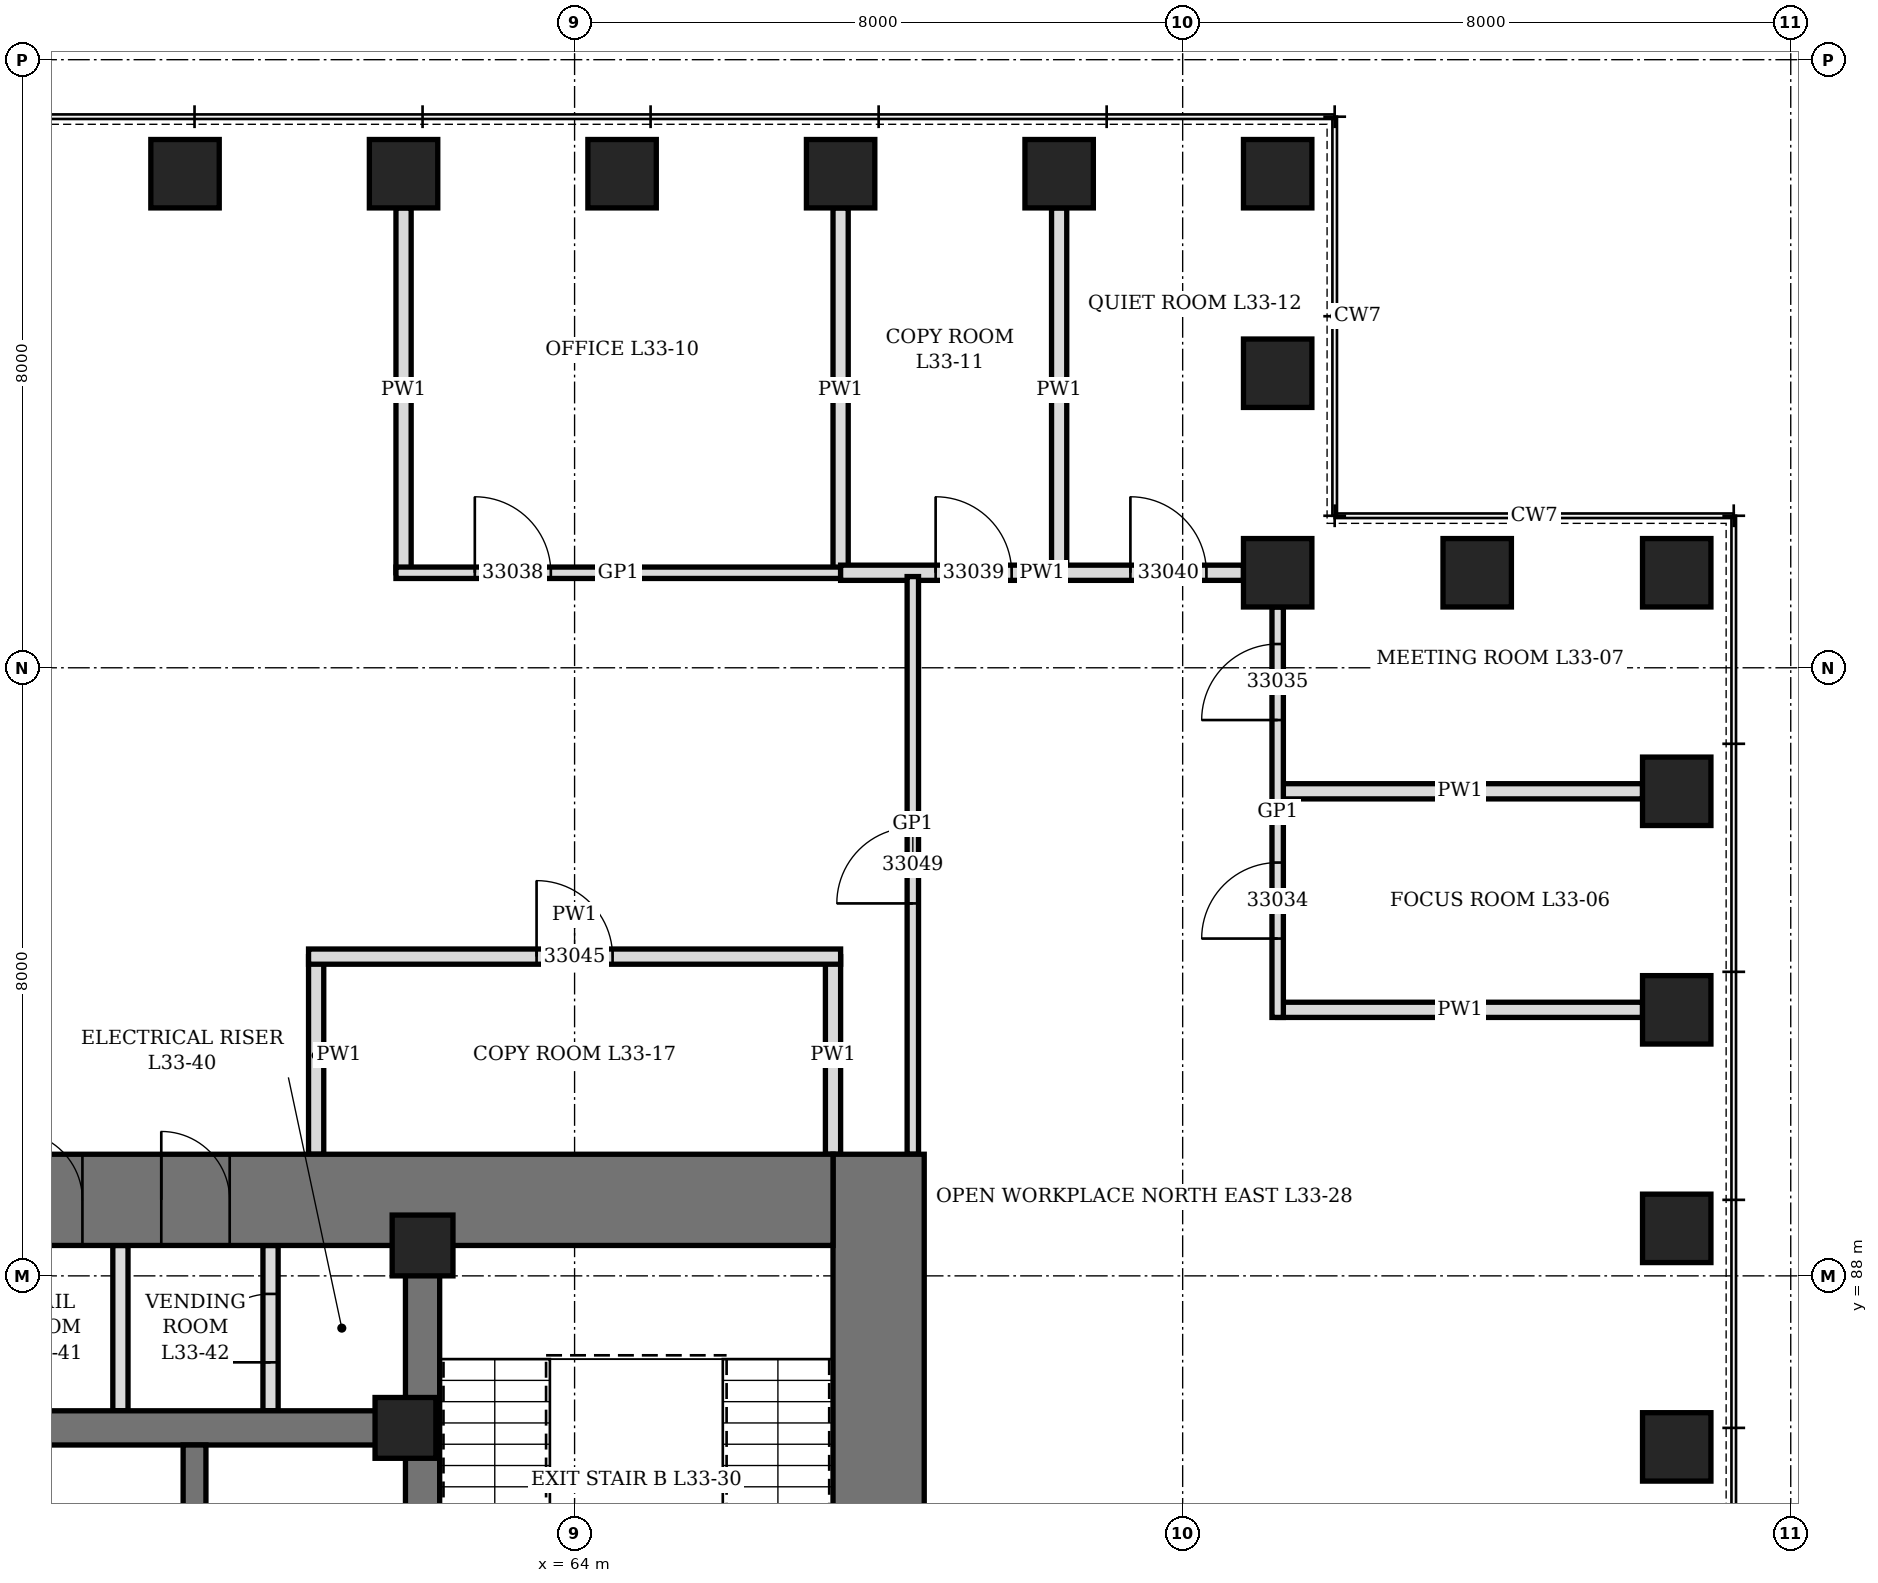
"""IFC4 building model, lengths in metres.
Left out: names, types, materials, properties, quantities, classifications, styles, units other than length and angle.
Written with IfcOpenShell. Run it as: python <this file> out.ifc"""

import sys

from ifc_helpers import new_model, si_unit, direction, frame, frame_2d, origin, origin_2d, place, context, subcontext, project, spatial, rectangle, hollow_rectangle, extrude, element, fill, save


model = new_model("IFC4")
c1 = context("Model", 3, precision=1e-05, world=origin(), true_north=direction((0.0, 1.0)))
c2 = subcontext(c1, "Body", "Model", "MODEL_VIEW")
j1 = project(units=[si_unit("LENGTHUNIT", "METRE"), si_unit("PLANEANGLEUNIT", "RADIAN")], contexts=[c1])
p1 = place(None, origin())
s1 = spatial("IfcSite", under=j1, at=p1, CompositionType="ELEMENT")
p2 = place(p1, origin())
s2 = spatial("IfcBuilding", under=s1, at=p2, CompositionType="ELEMENT")
p3 = place(p2, frame((0.0, 0.0, 150.1)))
s3 = spatial("IfcBuildingStorey", under=s2, at=p3, CompositionType="ELEMENT", Elevation=150.1)
for number, where, z_axis, x_axis in (
    (1, (78.5, 85.75, 0.0), (0.0, 0.0, 1.0), (0.0, 1.0, 0.0)),
    (2, (78.5, 88.625, 0.0), (0.0, 0.0, 1.0), (0.0, 1.0, 0.0)),
    (3, (78.5, 91.5, 0.0), (0.0, 0.0, 1.0), (0.0, 1.0, 0.0)),
    (4, (78.5, 94.375, 0.0), (0.0, 0.0, 1.0), (0.0, 1.0, 0.0)),
    (5, (78.5, 97.25, 0.0), (0.0, 0.0, 1.0), (1.0, 0.0, 0.0)),
    (6, (75.875, 97.25, 0.0), (0.0, 0.0, 1.0), (1.0, 0.0, 0.0)),
    (7, (73.25, 97.25, 0.0), (0.0, 0.0, 1.0), (0.0, 1.0, 0.0)),
    (8, (73.25, 99.875, 0.0), (0.0, 0.0, 1.0), (0.0, 1.0, 0.0)),
    (9, (73.25, 102.5, 0.0), (0.0, 0.0, 1.0), (1.0, 0.0, 0.0)),
    (10, (70.375, 102.5, 0.0), (0.0, 0.0, 1.0), (1.0, 0.0, 0.0)),
    (11, (67.5, 102.5, 0.0), (0.0, 0.0, 1.0), (1.0, 0.0, 0.0)),
    (12, (64.625, 102.5, 0.0), (0.0, 0.0, 1.0), (1.0, 0.0, 0.0)),
    (13, (61.75, 102.5, 0.0), (0.0, 0.0, 1.0), (1.0, 0.0, 0.0)),
    (14, (58.875, 102.5, 0.0), (0.0, 0.0, 1.0), (1.0, 0.0, 0.0)),
):
    element("IfcColumn", number, at=place(p3, frame(where, z_axis=z_axis, x_axis=x_axis)), inside=s3, PredefinedType="COLUMN", context=c2, shape_type="SweptSolid", body=[
        extrude(hollow_rectangle(XDim=0.9, YDim=0.9, WallThickness=0.12, at=origin_2d()), origin(), (0.0, 0.0, 1.0), 4.2),
    ])
p4 = place(p3, frame((68.0, 70.4, 0.0), z_axis=(0.0, 0.0, 1.0), x_axis=(0.0, 1.0, 0.0)))
e15 = element("IfcWall", 15, at=p4, inside=s3, PredefinedType="SHEAR", context=c2, shape_type="SweptSolid", body=[
    extrude(rectangle(XDim=19.2, YDim=1.2, at=frame_2d((9.6, 0.0))), origin(), (0.0, 0.0, 1.0), 4.2),
])
p5 = place(p4, frame((8.6, 0.0, 0.0)))
e16 = element("IfcOpeningElement", 16, at=p5, cuts=e15, PredefinedType="OPENING", context=c2, shape_type="SweptSolid", body=[
    extrude(rectangle(XDim=2.0, YDim=2.4, at=frame_2d((1.0, 1.2))), frame((0.0, 0.61, 0.0), z_axis=(0.0, -1.0, 0.0), x_axis=(1.0, 0.0, 0.0)), (0.0, 0.0, 1.0), 1.22),
])
p6 = place(p3, frame((44.6, 89.0, 0.0), z_axis=(0.0, 0.0, 1.0), x_axis=(1.0, 0.0, 0.0)))
e17 = element("IfcWall", 17, at=p6, inside=s3, PredefinedType="SHEAR", context=c2, shape_type="SweptSolid", body=[
    extrude(rectangle(XDim=22.8, YDim=1.2, at=frame_2d((11.4, 0.0))), origin(), (0.0, 0.0, 1.0), 4.2),
])
p7 = place(p6, frame((9.275, 0.0, 0.0)))
e18 = element("IfcOpeningElement", 18, at=p7, cuts=e17, PredefinedType="OPENING", context=c2, shape_type="SweptSolid", body=[
    extrude(rectangle(XDim=1.0, YDim=2.1, at=frame_2d((0.5, 1.05))), frame((0.0, 0.61, 0.0), z_axis=(0.0, -1.0, 0.0), x_axis=(1.0, 0.0, 0.0)), (0.0, 0.0, 1.0), 1.22),
])
p8 = place(p6, frame((6.45, 0.0, 0.0)))
e19 = element("IfcOpeningElement", 19, at=p8, cuts=e17, PredefinedType="OPENING", context=c2, shape_type="SweptSolid", body=[
    extrude(rectangle(XDim=0.9, YDim=2.1, at=frame_2d((0.45, 1.05))), frame((0.0, 0.61, 0.0), z_axis=(0.0, -1.0, 0.0), x_axis=(1.0, 0.0, 0.0)), (0.0, 0.0, 1.0), 1.22),
])
p9 = place(p6, frame((12.025, 0.0, 0.0)))
e20 = element("IfcOpeningElement", 20, at=p9, cuts=e17, PredefinedType="OPENING", context=c2, shape_type="SweptSolid", body=[
    extrude(rectangle(XDim=0.9, YDim=2.1, at=frame_2d((0.45, 1.05))), frame((0.0, 0.61, 0.0), z_axis=(0.0, -1.0, 0.0), x_axis=(1.0, 0.0, 0.0)), (0.0, 0.0, 1.0), 1.22),
])
p10 = place(p6, frame((13.962, 0.0, 0.0)))
e21 = element("IfcOpeningElement", 21, at=p10, cuts=e17, PredefinedType="OPENING", context=c2, shape_type="SweptSolid", body=[
    extrude(rectangle(XDim=0.9, YDim=2.1, at=frame_2d((0.45, 1.05))), frame((0.0, 0.61, 0.0), z_axis=(0.0, -1.0, 0.0), x_axis=(1.0, 0.0, 0.0)), (0.0, 0.0, 1.0), 1.22),
])
p11 = place(p3, frame((62.0, 71.6, 0.0), z_axis=(0.0, 0.0, 1.0), x_axis=(0.0, 1.0, 0.0)))
e22 = element("IfcWall", 22, at=p11, inside=s3, PredefinedType="SHEAR", context=c2, shape_type="SweptSolid", body=[
    extrude(rectangle(XDim=16.8, YDim=0.45, at=frame_2d((8.4, 0.0))), origin(), (0.0, 0.0, 1.0), 4.2),
])
p12 = place(p11, frame((7.5, 0.0, 0.0)))
e23 = element("IfcOpeningElement", 23, at=p12, cuts=e22, PredefinedType="OPENING", context=c2, shape_type="SweptSolid", body=[
    extrude(rectangle(XDim=1.8, YDim=2.4, at=frame_2d((0.9, 1.2))), frame((0.0, 0.235, 0.0), z_axis=(0.0, -1.0, 0.0), x_axis=(1.0, 0.0, 0.0)), (0.0, 0.0, 1.0), 0.47),
])
p13 = place(p3, frame((50.225, 86.0, 0.0), z_axis=(0.0, 0.0, 1.0), x_axis=(1.0, 0.0, 0.0)))
e24 = element("IfcWall", 24, at=p13, inside=s3, PredefinedType="SHEAR", context=c2, shape_type="SweptSolid", body=[
    extrude(rectangle(XDim=11.55, YDim=0.45, at=frame_2d((5.775, 0.0))), origin(), (0.0, 0.0, 1.0), 4.2),
])
p14 = place(p3, frame((59.0, 82.225, 0.0), z_axis=(0.0, 0.0, 1.0), x_axis=(0.0, 1.0, 0.0)))
e25 = element("IfcWall", 25, at=p14, inside=s3, PredefinedType="SHEAR", context=c2, shape_type="SweptSolid", body=[
    extrude(rectangle(XDim=3.55, YDim=0.3, at=frame_2d((1.775, 0.0))), origin(), (0.0, 0.0, 1.0), 4.2),
])
for number, where, z_axis, x_axis in (
    (26, (61.775, 86.0, 0.0), (0.0, 0.0, 1.0), (1.0, 0.0, 0.0)),
    (27, (62.0, 88.4, 0.0), (0.0, 0.0, 1.0), (1.0, 0.0, 0.0)),
):
    element("IfcColumn", number, at=place(p3, frame(where, z_axis=z_axis, x_axis=x_axis)), inside=s3, PredefinedType="COLUMN", context=c2, shape_type="SweptSolid", body=[
        extrude(hollow_rectangle(XDim=0.8, YDim=0.8, WallThickness=0.1, at=origin_2d()), origin(), (0.0, 0.0, 1.0), 4.2),
    ])
p15 = place(p3, frame((60.0, 86.225, 0.0), z_axis=(0.0, 0.0, 1.0), x_axis=(0.0, 1.0, 0.0)))
e28 = element("IfcWall", 28, at=p15, inside=s3, PredefinedType="PARTITIONING", context=c2, shape_type="SweptSolid", body=[
    extrude(rectangle(XDim=2.175, YDim=0.2, at=frame_2d((1.087, 0.0))), origin(), (0.0, 0.0, 1.0), 4.04),
])
p16 = place(p15, frame((0.637, 0.0, 0.0)))
e29 = element("IfcOpeningElement", 29, at=p16, cuts=e28, PredefinedType="OPENING", context=c2, shape_type="SweptSolid", body=[
    extrude(rectangle(XDim=0.9, YDim=2.1, at=frame_2d((0.45, 1.05))), frame((0.0, 0.11, 0.0), z_axis=(0.0, -1.0, 0.0), x_axis=(1.0, 0.0, 0.0)), (0.0, 0.0, 1.0), 0.22),
])
p17 = place(p3, frame((58.025, 86.225, 0.0), z_axis=(0.0, 0.0, 1.0), x_axis=(0.0, 1.0, 0.0)))
e30 = element("IfcWall", 30, at=p17, inside=s3, PredefinedType="PARTITIONING", context=c2, shape_type="SweptSolid", body=[
    extrude(rectangle(XDim=2.175, YDim=0.2, at=frame_2d((1.087, 0.0))), origin(), (0.0, 0.0, 1.0), 4.04),
])
for number, where, z_axis, x_axis in (
    (31, (73.25, 91.5, 0.0), (0.0, 0.0, 1.0), (1.0, 0.0, 0.0)),
    (32, (73.25, 94.375, 0.0), (0.0, 0.0, 1.0), (1.0, 0.0, 0.0)),
):
    element("IfcWall", number, at=place(p3, frame(where, z_axis=z_axis, x_axis=x_axis)), inside=s3, PredefinedType="PARTITIONING", context=c2, shape_type="SweptSolid", body=[
        extrude(rectangle(XDim=4.8, YDim=0.2, at=frame_2d((2.4, 0.0))), origin(), (0.0, 0.0, 1.0), 3.428),
    ])
p18 = place(p3, frame((61.75, 97.25, 0.0), z_axis=(0.0, 0.0, 1.0), x_axis=(0.0, 1.0, 0.0)))
e33 = element("IfcWall", 33, at=p18, inside=s3, PredefinedType="PARTITIONING", context=c2, shape_type="SweptSolid", body=[
    extrude(rectangle(XDim=4.8, YDim=0.2, at=frame_2d((2.4, 0.0))), origin(), (0.0, 0.0, 1.0), 3.278),
])
p19 = place(p3, frame((67.5, 97.25, 0.0), z_axis=(0.0, 0.0, 1.0), x_axis=(0.0, 1.0, 0.0)))
e34 = element("IfcWall", 34, at=p19, inside=s3, PredefinedType="PARTITIONING", context=c2, shape_type="SweptSolid", body=[
    extrude(rectangle(XDim=4.8, YDim=0.2, at=frame_2d((2.4, 0.0))), origin(), (0.0, 0.0, 1.0), 2.74),
])
p20 = place(p3, frame((70.375, 97.25, 0.0), z_axis=(0.0, 0.0, 1.0), x_axis=(0.0, 1.0, 0.0)))
e35 = element("IfcWall", 35, at=p20, inside=s3, PredefinedType="PARTITIONING", context=c2, shape_type="SweptSolid", body=[
    extrude(rectangle(XDim=4.8, YDim=0.2, at=frame_2d((2.4, 0.0))), origin(), (0.0, 0.0, 1.0), 3.428),
])
p21 = place(p3, frame((60.6, 89.6, 0.0), z_axis=(0.0, 0.0, 1.0), x_axis=(0.0, 1.0, 0.0)))
e36 = element("IfcWall", 36, at=p21, inside=s3, PredefinedType="PARTITIONING", context=c2, shape_type="SweptSolid", body=[
    extrude(rectangle(XDim=2.6, YDim=0.2, at=frame_2d((1.3, 0.0))), origin(), (0.0, 0.0, 1.0), 4.04),
])
p22 = place(p3, frame((67.4, 89.6, 0.0), z_axis=(0.0, 0.0, 1.0), x_axis=(0.0, 1.0, 0.0)))
e37 = element("IfcWall", 37, at=p22, inside=s3, PredefinedType="PARTITIONING", context=c2, shape_type="SweptSolid", body=[
    extrude(rectangle(XDim=2.6, YDim=0.2, at=frame_2d((1.3, 0.0))), origin(), (0.0, 0.0, 1.0), 2.74),
])
p23 = place(p3, frame((60.5, 92.2, 0.0), z_axis=(0.0, 0.0, 1.0), x_axis=(1.0, 0.0, 0.0)))
e38 = element("IfcWall", 38, at=p23, inside=s3, PredefinedType="PARTITIONING", context=c2, shape_type="SweptSolid", body=[
    extrude(rectangle(XDim=7.0, YDim=0.2, at=frame_2d((3.5, 0.0))), origin(), (0.0, 0.0, 1.0), 4.04),
])
p24 = place(p23, frame((3.0, 0.0, 0.0)))
e39 = element("IfcOpeningElement", 39, at=p24, cuts=e38, PredefinedType="OPENING", context=c2, shape_type="SweptSolid", body=[
    extrude(rectangle(XDim=1.0, YDim=2.1, at=frame_2d((0.5, 1.05))), frame((0.0, 0.11, 0.0), z_axis=(0.0, -1.0, 0.0), x_axis=(1.0, 0.0, 0.0)), (0.0, 0.0, 1.0), 0.22),
])
p25 = place(p3, frame((61.65, 97.25, 0.0), z_axis=(0.0, 0.0, 1.0), x_axis=(1.0, 0.0, 0.0)))
e40 = element("IfcWall", 40, at=p25, inside=s3, PredefinedType="PARTITIONING", context=c2, shape_type="SweptSolid", body=[
    extrude(rectangle(XDim=5.85, YDim=0.15, at=frame_2d((2.925, 0.0))), origin(), (0.0, 0.0, 1.0), 4.04),
])
p26 = place(p25, frame((1.038, 0.0, 0.0)))
e41 = element("IfcOpeningElement", 41, at=p26, cuts=e40, PredefinedType="OPENING", context=c2, shape_type="SweptSolid", body=[
    extrude(rectangle(XDim=1.0, YDim=2.1, at=frame_2d((0.5, 1.05))), frame((0.0, 0.085, 0.0), z_axis=(0.0, -1.0, 0.0), x_axis=(1.0, 0.0, 0.0)), (0.0, 0.0, 1.0), 0.17),
])
p27 = place(p3, frame((67.5, 97.25, 0.0), z_axis=(0.0, 0.0, 1.0), x_axis=(1.0, 0.0, 0.0)))
e42 = element("IfcWall", 42, at=p27, inside=s3, PredefinedType="PARTITIONING", context=c2, shape_type="SweptSolid", body=[
    extrude(rectangle(XDim=5.3, YDim=0.2, at=frame_2d((2.65, 0.0))), origin(), (0.0, 0.0, 1.0), 4.04),
])
p28 = place(p27, frame((1.25, 0.0, 0.0)))
e43 = element("IfcOpeningElement", 43, at=p28, cuts=e42, PredefinedType="OPENING", context=c2, shape_type="SweptSolid", body=[
    extrude(rectangle(XDim=1.0, YDim=2.1, at=frame_2d((0.5, 1.05))), frame((0.0, 0.11, 0.0), z_axis=(0.0, -1.0, 0.0), x_axis=(1.0, 0.0, 0.0)), (0.0, 0.0, 1.0), 0.22),
])
p29 = place(p27, frame((3.812, 0.0, 0.0)))
e44 = element("IfcOpeningElement", 44, at=p29, cuts=e42, PredefinedType="OPENING", context=c2, shape_type="SweptSolid", body=[
    extrude(rectangle(XDim=1.0, YDim=2.1, at=frame_2d((0.5, 1.05))), frame((0.0, 0.11, 0.0), z_axis=(0.0, -1.0, 0.0), x_axis=(1.0, 0.0, 0.0)), (0.0, 0.0, 1.0), 0.22),
])
p30 = place(p3, frame((68.45, 89.6, 0.0), z_axis=(0.0, 0.0, 1.0), x_axis=(0.0, 1.0, 0.0)))
e45 = element("IfcWall", 45, at=p30, inside=s3, PredefinedType="PARTITIONING", context=c2, shape_type="SweptSolid", body=[
    extrude(rectangle(XDim=7.6, YDim=0.15, at=frame_2d((3.8, 0.0))), origin(), (0.0, 0.0, 1.0), 4.04),
])
p31 = place(p30, frame((3.3, 0.0, 0.0)))
e46 = element("IfcOpeningElement", 46, at=p31, cuts=e45, PredefinedType="OPENING", context=c2, shape_type="SweptSolid", body=[
    extrude(rectangle(XDim=1.0, YDim=2.4, at=frame_2d((0.5, 1.2))), frame((0.0, 0.085, 0.0), z_axis=(0.0, -1.0, 0.0), x_axis=(1.0, 0.0, 0.0)), (0.0, 0.0, 1.0), 0.17),
])
p32 = place(p3, frame((73.25, 91.4, 0.0), z_axis=(0.0, 0.0, 1.0), x_axis=(0.0, 1.0, 0.0)))
e47 = element("IfcWall", 47, at=p32, inside=s3, PredefinedType="PARTITIONING", context=c2, shape_type="SweptSolid", body=[
    extrude(rectangle(XDim=5.4, YDim=0.15, at=frame_2d((2.7, 0.0))), origin(), (0.0, 0.0, 1.0), 4.04),
])
p33 = place(p32, frame((1.038, 0.0, 0.0)))
e48 = element("IfcOpeningElement", 48, at=p33, cuts=e47, PredefinedType="OPENING", context=c2, shape_type="SweptSolid", body=[
    extrude(rectangle(XDim=1.0, YDim=2.4, at=frame_2d((0.5, 1.2))), frame((0.0, 0.085, 0.0), z_axis=(0.0, -1.0, 0.0), x_axis=(1.0, 0.0, 0.0)), (0.0, 0.0, 1.0), 0.17),
])
p34 = place(p32, frame((3.913, 0.0, 0.0)))
e49 = element("IfcOpeningElement", 49, at=p34, cuts=e47, PredefinedType="OPENING", context=c2, shape_type="SweptSolid", body=[
    extrude(rectangle(XDim=1.0, YDim=2.4, at=frame_2d((0.5, 1.2))), frame((0.0, 0.085, 0.0), z_axis=(0.0, -1.0, 0.0), x_axis=(1.0, 0.0, 0.0)), (0.0, 0.0, 1.0), 0.17),
])
p35 = place(p9, origin())
e50 = element("IfcDoor", 50, at=p35, inside=s3, OperationType="SINGLE_SWING_LEFT", PredefinedType="DOOR", context=c2, shape_type="SweptSolid", body=[
    extrude(rectangle(XDim=0.9, YDim=2.1, at=frame_2d((0.45, 1.05))), frame((0.0, 0.35, 0.0), z_axis=(0.0, -1.0, 0.0), x_axis=(1.0, 0.0, 0.0)), (0.0, 0.0, 1.0), 0.7),
])
fill(e20, e50)
p36 = place(p10, origin())
e51 = element("IfcDoor", 51, at=p36, inside=s3, OperationType="SINGLE_SWING_LEFT", PredefinedType="DOOR", context=c2, shape_type="SweptSolid", body=[
    extrude(rectangle(XDim=0.9, YDim=2.1, at=frame_2d((0.45, 1.05))), frame((0.0, 0.35, 0.0), z_axis=(0.0, -1.0, 0.0), x_axis=(1.0, 0.0, 0.0)), (0.0, 0.0, 1.0), 0.7),
])
fill(e21, e51)
p37 = place(p16, origin())
e52 = element("IfcDoor", 52, at=p37, inside=s3, OperationType="SINGLE_SWING_LEFT", PredefinedType="DOOR", context=c2, shape_type="SweptSolid", body=[
    extrude(rectangle(XDim=0.9, YDim=2.1, at=frame_2d((0.45, 1.05))), frame((0.0, 0.1, 0.0), z_axis=(0.0, -1.0, 0.0), x_axis=(1.0, 0.0, 0.0)), (0.0, 0.0, 1.0), 0.199),
])
fill(e29, e52)
p38 = place(p33, origin())
e53 = element("IfcDoor", 53, at=p38, inside=s3, OperationType="SINGLE_SWING_RIGHT", PredefinedType="DOOR", context=c2, shape_type="SweptSolid", body=[
    extrude(rectangle(XDim=1.0, YDim=2.4, at=frame_2d((0.5, 1.2))), frame((0.0, 0.075, 0.0), z_axis=(0.0, -1.0, 0.0), x_axis=(1.0, 0.0, 0.0)), (0.0, 0.0, 1.0), 0.149),
])
fill(e48, e53)
p39 = place(p34, origin())
e54 = element("IfcDoor", 54, at=p39, inside=s3, OperationType="SINGLE_SWING_RIGHT", PredefinedType="DOOR", context=c2, shape_type="SweptSolid", body=[
    extrude(rectangle(XDim=1.0, YDim=2.4, at=frame_2d((0.5, 1.2))), frame((0.0, 0.075, 0.0), z_axis=(0.0, -1.0, 0.0), x_axis=(1.0, 0.0, 0.0)), (0.0, 0.0, 1.0), 0.149),
])
fill(e49, e54)
p40 = place(p26, origin())
e55 = element("IfcDoor", 55, at=p40, inside=s3, OperationType="SINGLE_SWING_LEFT", PredefinedType="DOOR", context=c2, shape_type="SweptSolid", body=[
    extrude(rectangle(XDim=1.0, YDim=2.1, at=frame_2d((0.5, 1.05))), frame((0.0, 0.075, 0.0), z_axis=(0.0, -1.0, 0.0), x_axis=(1.0, 0.0, 0.0)), (0.0, 0.0, 1.0), 0.149),
])
fill(e41, e55)
p41 = place(p28, origin())
e56 = element("IfcDoor", 56, at=p41, inside=s3, OperationType="SINGLE_SWING_LEFT", PredefinedType="DOOR", context=c2, shape_type="SweptSolid", body=[
    extrude(rectangle(XDim=1.0, YDim=2.1, at=frame_2d((0.5, 1.05))), frame((0.0, 0.1, 0.0), z_axis=(0.0, -1.0, 0.0), x_axis=(1.0, 0.0, 0.0)), (0.0, 0.0, 1.0), 0.199),
])
fill(e43, e56)
p42 = place(p29, origin())
e57 = element("IfcDoor", 57, at=p42, inside=s3, OperationType="SINGLE_SWING_LEFT", PredefinedType="DOOR", context=c2, shape_type="SweptSolid", body=[
    extrude(rectangle(XDim=1.0, YDim=2.1, at=frame_2d((0.5, 1.05))), frame((0.0, 0.1, 0.0), z_axis=(0.0, -1.0, 0.0), x_axis=(1.0, 0.0, 0.0)), (0.0, 0.0, 1.0), 0.199),
])
fill(e44, e57)
p43 = place(p24, origin())
e58 = element("IfcDoor", 58, at=p43, inside=s3, OperationType="SINGLE_SWING_LEFT", PredefinedType="DOOR", context=c2, shape_type="SweptSolid", body=[
    extrude(rectangle(XDim=1.0, YDim=2.1, at=frame_2d((0.5, 1.05))), frame((0.0, 0.1, 0.0), z_axis=(0.0, -1.0, 0.0), x_axis=(1.0, 0.0, 0.0)), (0.0, 0.0, 1.0), 0.199),
])
fill(e39, e58)
p44 = place(p31, origin())
e59 = element("IfcDoor", 59, at=p44, inside=s3, OperationType="SINGLE_SWING_RIGHT", PredefinedType="DOOR", context=c2, shape_type="SweptSolid", body=[
    extrude(rectangle(XDim=1.0, YDim=2.4, at=frame_2d((0.5, 1.2))), frame((0.0, 0.075, 0.0), z_axis=(0.0, -1.0, 0.0), x_axis=(1.0, 0.0, 0.0)), (0.0, 0.0, 1.0), 0.149),
])
fill(e46, e59)
save(model, sys.argv[1])
